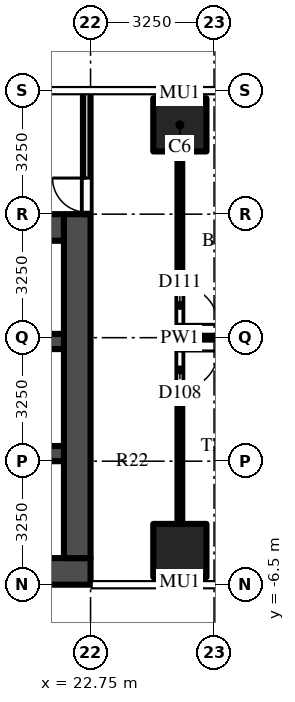
"""IFC4 building model, lengths in metres.
Left out: names, types, materials, properties, quantities, classifications, styles, units other than length and angle.
Written with IfcOpenShell. Run it as: python <this file> out.ifc"""

import sys

from ifc_helpers import new_model, si_unit, direction, frame, frame_2d, origin, origin_2d, place, context, subcontext, project, spatial, rectangle, extrude, source, transform, mapped, element, fill, save


model = new_model("IFC4")
c1 = context("Model", 3, precision=1e-05, world=origin(), true_north=direction((0.0, 1.0)))
c2 = subcontext(c1, "Body", "Model", "MODEL_VIEW")
j1 = project(units=[si_unit("LENGTHUNIT", "METRE"), si_unit("PLANEANGLEUNIT", "RADIAN")], contexts=[c1])
p1 = place(None, origin())
s1 = spatial("IfcSite", under=j1, at=p1, CompositionType="ELEMENT")
p2 = place(p1, origin())
s2 = spatial("IfcBuilding", under=s1, at=p2, CompositionType="ELEMENT")
p3 = place(p2, frame((0.0, 0.0, 52.0)))
s3 = spatial("IfcBuildingStorey", under=s2, at=p3, CompositionType="ELEMENT", Elevation=52.0)
m1 = source(origin(), c2, "Body", "SweptSolid", [
    extrude(rectangle(XDim=1.4, YDim=1.4, at=origin_2d()), origin(), (0.0, 0.0, 1.0), 4.5),
])
for number, where, z_axis, x_axis in (
    (1, (25.1, 5.6, 0.0), (0.0, 0.0, 1.0), (1.0, 0.0, 0.0)),
    (2, (25.1, -5.6, 0.0), (0.0, 0.0, 1.0), (1.0, 0.0, 0.0)),
):
    element("IfcColumn", number, at=place(p3, frame(where, z_axis=z_axis, x_axis=x_axis)), inside=s3, PredefinedType="COLUMN", context=c2, shape_type="MappedRepresentation", body=[
        mapped(m1, transform((0.0, 0.0, 0.0))),
    ])
m2 = source(origin(), c2, "Body", "SweptSolid", [
    extrude(rectangle(XDim=16.45, YDim=0.7, at=frame_2d((8.225, 0.0))), origin(), (0.0, 0.0, 1.0), 4.25),
])
p4 = place(p3, frame((6.3, -6.15, 0.0), z_axis=(0.0, 0.0, 1.0), x_axis=(1.0, 0.0, 0.0)))
e3 = element("IfcWall", 3, at=p4, inside=s3, PredefinedType="SHEAR", context=c2, shape_type="MappedRepresentation", body=[
    mapped(m2, transform((0.0, 0.0, 0.0))),
])
m3 = source(origin(), c2, "Body", "SweptSolid", [
    extrude(rectangle(XDim=14.85, YDim=0.7, at=frame_2d((7.425, 0.0))), origin(), (0.0, 0.0, 1.0), 4.25),
])
p5 = place(p3, frame((7.2, 2.9, 0.0), z_axis=(0.0, 0.0, 1.0), x_axis=(1.0, 0.0, 0.0)))
e4 = element("IfcWall", 4, at=p5, inside=s3, PredefinedType="SHEAR", context=c2, shape_type="MappedRepresentation", body=[
    mapped(m3, transform((0.0, 0.0, 0.0))),
])
m4 = source(origin(), c2, "Body", "SweptSolid", [
    extrude(rectangle(XDim=1.3, YDim=2.1, at=frame_2d((0.65, 1.05))), frame((0.0, 0.36, 0.0), z_axis=(0.0, -1.0, 0.0), x_axis=(1.0, 0.0, 0.0)), (0.0, 0.0, 1.0), 0.72),
])
p6 = place(p5, frame((12.2, 0.0, 0.0)))
e5 = element("IfcOpeningElement", 5, at=p6, cuts=e4, PredefinedType="OPENING", context=c2, shape_type="MappedRepresentation", body=[
    mapped(m4, transform((0.0, 0.0, 0.0))),
])
m5 = source(origin(), c2, "Body", "SweptSolid", [
    extrude(rectangle(XDim=1.2, YDim=2.1, at=frame_2d((0.6, 1.05))), frame((0.0, 0.36, 0.0), z_axis=(0.0, -1.0, 0.0), x_axis=(1.0, 0.0, 0.0)), (0.0, 0.0, 1.0), 0.72),
])
p7 = place(p5, frame((9.85, 0.0, 0.0)))
e6 = element("IfcOpeningElement", 6, at=p7, cuts=e4, PredefinedType="OPENING", context=c2, shape_type="MappedRepresentation", body=[
    mapped(m5, transform((0.0, 0.0, 0.0))),
])
m6 = source(origin(), c2, "Body", "SweptSolid", [
    extrude(rectangle(XDim=1.0, YDim=2.1, at=frame_2d((0.5, 1.05))), frame((0.0, 0.36, 0.0), z_axis=(0.0, -1.0, 0.0), x_axis=(1.0, 0.0, 0.0)), (0.0, 0.0, 1.0), 0.72),
])
p8 = place(p5, frame((7.9, 0.0, 0.0)))
e7 = element("IfcOpeningElement", 7, at=p8, cuts=e4, PredefinedType="OPENING", context=c2, shape_type="MappedRepresentation", body=[
    mapped(m6, transform((0.0, 0.0, 0.0))),
])
m7 = source(origin(), c2, "Body", "SweptSolid", [
    extrude(rectangle(XDim=0.8, YDim=2.1, at=frame_2d((0.4, 1.05))), frame((0.0, 0.36, 0.0), z_axis=(0.0, -1.0, 0.0), x_axis=(1.0, 0.0, 0.0)), (0.0, 0.0, 1.0), 0.72),
])
p9 = place(p5, frame((0.113, 0.0, 0.0)))
e8 = element("IfcOpeningElement", 8, at=p9, cuts=e4, PredefinedType="OPENING", context=c2, shape_type="MappedRepresentation", body=[
    mapped(m7, transform((0.0, 0.0, 0.0))),
])
p10 = place(p5, frame((1.288, 0.0, 0.0)))
e9 = element("IfcOpeningElement", 9, at=p10, cuts=e4, PredefinedType="OPENING", context=c2, shape_type="MappedRepresentation", body=[
    mapped(m7, transform((0.0, 0.0, 0.0))),
])
p11 = place(p5, frame((2.712, 0.0, 0.0)))
e10 = element("IfcOpeningElement", 10, at=p11, cuts=e4, PredefinedType="OPENING", context=c2, shape_type="MappedRepresentation", body=[
    mapped(m7, transform((0.0, 0.0, 0.0))),
])
p12 = place(p5, frame((3.887, 0.0, 0.0)))
e11 = element("IfcOpeningElement", 11, at=p12, cuts=e4, PredefinedType="OPENING", context=c2, shape_type="MappedRepresentation", body=[
    mapped(m7, transform((0.0, 0.0, 0.0))),
])
p13 = place(p5, frame((5.312, 0.0, 0.0)))
e12 = element("IfcOpeningElement", 12, at=p13, cuts=e4, PredefinedType="OPENING", context=c2, shape_type="MappedRepresentation", body=[
    mapped(m7, transform((0.0, 0.0, 0.0))),
])
p14 = place(p5, frame((6.488, 0.0, 0.0)))
e13 = element("IfcOpeningElement", 13, at=p14, cuts=e4, PredefinedType="OPENING", context=c2, shape_type="MappedRepresentation", body=[
    mapped(m7, transform((0.0, 0.0, 0.0))),
])
m8 = source(origin(), c2, "Body", "SweptSolid", [
    extrude(rectangle(XDim=9.05, YDim=0.7, at=frame_2d((4.525, 0.0))), origin(), (0.0, 0.0, 1.0), 4.25),
])
p15 = place(p3, frame((22.4, -5.8, 0.0), z_axis=(0.0, 0.0, 1.0), x_axis=(0.0, 1.0, 0.0)))
e14 = element("IfcWall", 14, at=p15, inside=s3, PredefinedType="SHEAR", context=c2, shape_type="MappedRepresentation", body=[
    mapped(m8, transform((0.0, 0.0, 0.0))),
])
m9 = source(origin(), c2, "Body", "SweptSolid", [
    extrude(rectangle(XDim=14.85, YDim=0.4, at=frame_2d((7.425, 0.0))), origin(), (0.0, 0.0, 1.0), 4.25),
])
p16 = place(p3, frame((7.2, -0.1, 0.0), z_axis=(0.0, 0.0, 1.0), x_axis=(1.0, 0.0, 0.0)))
e15 = element("IfcWall", 15, at=p16, inside=s3, PredefinedType="SHEAR", context=c2, shape_type="MappedRepresentation", body=[
    mapped(m9, transform((0.0, 0.0, 0.0))),
])
m10 = source(origin(), c2, "Body", "SweptSolid", [
    extrude(rectangle(XDim=1.0, YDim=2.1, at=frame_2d((0.5, 1.05))), frame((0.0, 0.21, 0.0), z_axis=(0.0, -1.0, 0.0), x_axis=(1.0, 0.0, 0.0)), (0.0, 0.0, 1.0), 0.42),
])
p17 = place(p16, frame((7.9, 0.0, 0.0)))
e16 = element("IfcOpeningElement", 16, at=p17, cuts=e15, PredefinedType="OPENING", context=c2, shape_type="MappedRepresentation", body=[
    mapped(m10, transform((0.0, 0.0, 0.0))),
])
m11 = source(origin(), c2, "Body", "SweptSolid", [
    extrude(rectangle(XDim=5.7, YDim=0.4, at=frame_2d((2.85, 0.0))), origin(), (0.0, 0.0, 1.0), 4.25),
])
p18 = place(p3, frame((16.35, -3.05, 0.0), z_axis=(0.0, 0.0, 1.0), x_axis=(1.0, 0.0, 0.0)))
e17 = element("IfcWall", 17, at=p18, inside=s3, PredefinedType="SHEAR", context=c2, shape_type="MappedRepresentation", body=[
    mapped(m11, transform((0.0, 0.0, 0.0))),
])
m12 = source(origin(), c2, "Body", "SweptSolid", [
    extrude(rectangle(XDim=3.25, YDim=0.2, at=frame_2d((1.625, 0.0))), origin(), (0.0, 0.0, 1.0), 4.25),
])
p19 = place(p3, frame((22.65, 3.25, 0.0), z_axis=(0.0, 0.0, 1.0), x_axis=(0.0, 1.0, 0.0)))
e18 = element("IfcWall", 18, at=p19, inside=s3, PredefinedType="PARTITIONING", context=c2, shape_type="MappedRepresentation", body=[
    mapped(m12, transform((0.0, 0.0, 0.0))),
])
m13 = source(origin(), c2, "Body", "SweptSolid", [
    extrude(rectangle(XDim=0.9, YDim=2.1, at=frame_2d((0.45, 1.05))), frame((0.0, 0.11, 0.0), z_axis=(0.0, -1.0, 0.0), x_axis=(1.0, 0.0, 0.0)), (0.0, 0.0, 1.0), 0.22),
])
p20 = place(p19, frame((0.05, 0.0, 0.0)))
e19 = element("IfcOpeningElement", 19, at=p20, cuts=e18, PredefinedType="OPENING", context=c2, shape_type="MappedRepresentation", body=[
    mapped(m13, transform((0.0, 0.0, 0.0))),
])
m14 = source(origin(), c2, "Body", "SweptSolid", [
    extrude(rectangle(XDim=9.8, YDim=0.125, at=frame_2d((4.9, 0.0))), origin(), (0.0, 0.0, 1.0), 3.468),
])
p21 = place(p3, frame((25.1, 4.9, 0.0), z_axis=(0.0, 0.0, 1.0), x_axis=(0.0, -1.0, 0.0)))
e20 = element("IfcWall", 20, at=p21, inside=s3, PredefinedType="PARTITIONING", context=c2, shape_type="MappedRepresentation", body=[
    mapped(m14, transform((0.0, 0.0, 0.0))),
])
m15 = source(origin(), c2, "Body", "SweptSolid", [
    extrude(rectangle(XDim=1.0, YDim=2.1, at=frame_2d((0.5, 1.05))), frame((0.0, 0.073, 0.0), z_axis=(0.0, -1.0, 0.0), x_axis=(1.0, 0.0, 0.0)), (0.0, 0.0, 1.0), 0.145),
])
p22 = place(p21, frame((5.25, 0.0, 0.0)))
e21 = element("IfcOpeningElement", 21, at=p22, cuts=e20, PredefinedType="OPENING", context=c2, shape_type="MappedRepresentation", body=[
    mapped(m15, transform((0.0, 0.0, 0.0))),
])
p23 = place(p21, frame((3.55, 0.0, 0.0)))
e22 = element("IfcOpeningElement", 22, at=p23, cuts=e20, PredefinedType="OPENING", context=c2, shape_type="MappedRepresentation", body=[
    mapped(m15, transform((0.0, 0.0, 0.0))),
])
m16 = source(origin(), c2, "Body", "SweptSolid", [
    extrude(rectangle(XDim=7.137, YDim=0.1, at=frame_2d((3.569, 0.0))), origin(), (0.0, 0.0, 1.0), 3.33),
])
p24 = place(p3, frame((25.163, 0.0, 0.0), z_axis=(0.0, 0.0, 1.0), x_axis=(1.0, 0.0, 0.0)))
e23 = element("IfcWall", 23, at=p24, inside=s3, PredefinedType="PARTITIONING", context=c2, shape_type="MappedRepresentation", body=[
    mapped(m16, transform((0.0, 0.0, 0.0))),
])
m17 = source(origin(), c2, "Body", "SweptSolid", [
    extrude(rectangle(XDim=0.9, YDim=2.1, at=frame_2d((0.45, 1.05))), frame((0.0, 0.025, 0.0), z_axis=(0.0, -1.0, 0.0), x_axis=(1.0, 0.0, 0.0)), (0.0, 0.0, 1.0), 0.05),
])
p25 = place(p20, origin())
e24 = element("IfcDoor", 24, at=p25, inside=s3, OperationType="SINGLE_SWING_RIGHT", PredefinedType="DOOR", context=c2, shape_type="MappedRepresentation", body=[
    mapped(m17, transform((0.0, 0.0, 0.0))),
])
fill(e19, e24)
m18 = source(origin(), c2, "Body", "SweptSolid", [
    extrude(rectangle(XDim=1.0, YDim=2.1, at=frame_2d((0.5, 1.05))), frame((0.0, 0.025, 0.0), z_axis=(0.0, -1.0, 0.0), x_axis=(1.0, 0.0, 0.0)), (0.0, 0.0, 1.0), 0.05),
])
p26 = place(p22, origin())
e25 = element("IfcDoor", 25, at=p26, inside=s3, OperationType="SINGLE_SWING_LEFT", PredefinedType="DOOR", context=c2, shape_type="MappedRepresentation", body=[
    mapped(m18, transform((0.0, 0.0, 0.0))),
])
fill(e21, e25)
p27 = place(p23, origin())
e26 = element("IfcDoor", 26, at=p27, inside=s3, OperationType="SINGLE_SWING_RIGHT", PredefinedType="DOOR", context=c2, shape_type="MappedRepresentation", body=[
    mapped(m18, transform((0.0, 0.0, 0.0))),
])
fill(e22, e26)
save(model, sys.argv[1])
